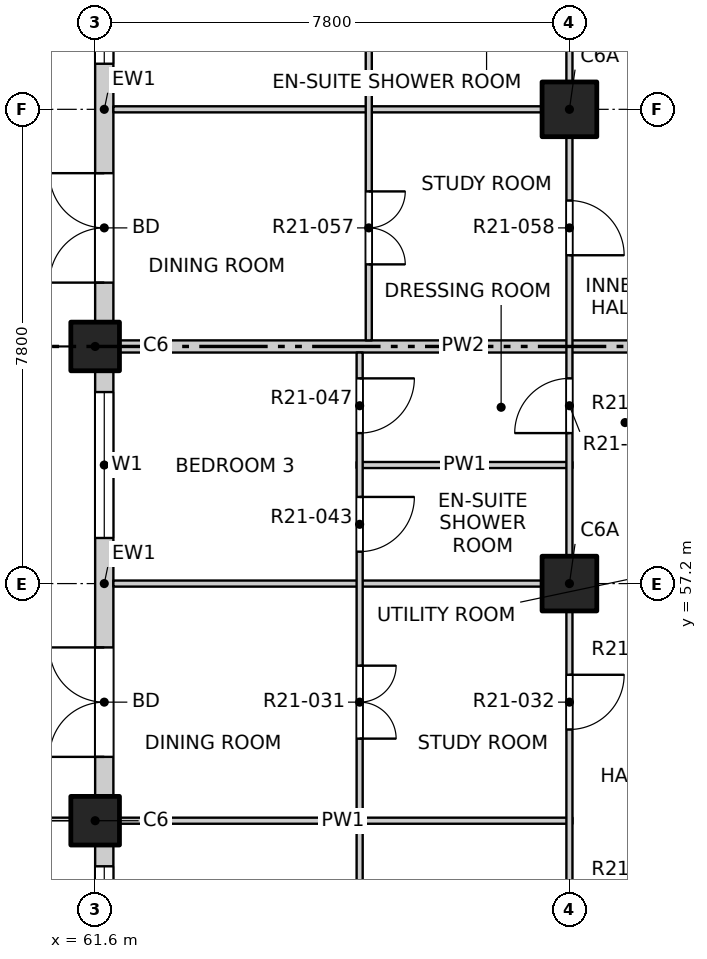
"""IFC4 building model, lengths in metres.
Left out: names, types, materials, properties, quantities, classifications, styles, units other than length and angle.
Written with IfcOpenShell. Run it as: python <this file> out.ifc"""

import sys

from ifc_helpers import new_model, si_unit, direction, frame, frame_2d, origin, origin_2d, place, context, subcontext, project, spatial, rectangle, extrude, element, fill, save


model = new_model("IFC4")
c1 = context("Model", 3, precision=1e-05, world=origin(), true_north=direction((0.0, 1.0)))
c2 = subcontext(c1, "Body", "Model", "MODEL_VIEW")
j1 = project(units=[si_unit("LENGTHUNIT", "METRE"), si_unit("PLANEANGLEUNIT", "RADIAN")], contexts=[c1])
p1 = place(None, origin())
s1 = spatial("IfcSite", under=j1, at=p1, CompositionType="ELEMENT")
p2 = place(p1, origin())
s2 = spatial("IfcBuilding", under=s1, at=p2, CompositionType="ELEMENT")
p3 = place(p2, frame((0.0, 0.0, 221.1)))
s3 = spatial("IfcBuildingStorey", under=s2, at=p3, CompositionType="ELEMENT", Elevation=221.1)
for number, where, z_axis, x_axis in (
    (1, (61.6, 53.3, -0.25), (0.0, 0.0, 1.0), (1.0, 0.0, 0.0)),
    (2, (61.6, 61.1, -0.25), (0.0, 0.0, 1.0), (1.0, 0.0, 0.0)),
):
    element("IfcColumn", number, at=place(p3, frame(where, z_axis=z_axis, x_axis=x_axis)), inside=s3, PredefinedType="COLUMN", context=c2, shape_type="SweptSolid", body=[
        extrude(rectangle(XDim=0.8, YDim=0.8, at=origin_2d()), origin(), (0.0, 0.0, 1.0), 3.4),
    ])
for number, where, z_axis, x_axis in (
    (3, (69.4, 57.2, -0.25), (0.0, 0.0, 1.0), (1.0, 0.0, 0.0)),
    (4, (69.4, 65.0, -0.25), (0.0, 0.0, 1.0), (1.0, 0.0, 0.0)),
):
    element("IfcColumn", number, at=place(p3, frame(where, z_axis=z_axis, x_axis=x_axis)), inside=s3, PredefinedType="COLUMN", context=c2, shape_type="SweptSolid", body=[
        extrude(rectangle(XDim=0.9, YDim=0.9, at=origin_2d()), origin(), (0.0, 0.0, 1.0), 3.4),
    ])
p4 = place(p3, frame((61.75, 45.5, 0.0), z_axis=(0.0, 0.0, 1.0), x_axis=(0.0, 1.0, 0.0)))
e5 = element("IfcWall", 5, at=p4, inside=s3, PredefinedType="SOLIDWALL", context=c2, shape_type="SweptSolid", body=[
    extrude(rectangle(XDim=7.4, YDim=0.3, at=frame_2d((3.7, 0.0))), origin(), (0.0, 0.0, 1.0), 2.7),
])
p5 = place(p4, frame((0.75, 0.0, 0.9)))
e6 = element("IfcOpeningElement", 6, at=p5, cuts=e5, PredefinedType="OPENING", context=c2, shape_type="SweptSolid", body=[
    extrude(rectangle(XDim=2.4, YDim=1.8, at=frame_2d((1.2, 0.9))), frame((0.0, 0.16, 0.0), z_axis=(0.0, -1.0, 0.0), x_axis=(1.0, 0.0, 0.0)), (0.0, 0.0, 1.0), 0.32),
])
p6 = place(p4, frame((4.65, 0.0, 0.9)))
e7 = element("IfcOpeningElement", 7, at=p6, cuts=e5, PredefinedType="OPENING", context=c2, shape_type="SweptSolid", body=[
    extrude(rectangle(XDim=2.4, YDim=1.8, at=frame_2d((1.2, 0.9))), frame((0.0, 0.16, 0.0), z_axis=(0.0, -1.0, 0.0), x_axis=(1.0, 0.0, 0.0)), (0.0, 0.0, 1.0), 0.32),
])
p7 = place(p3, frame((61.75, 53.7, 0.0), z_axis=(0.0, 0.0, 1.0), x_axis=(0.0, 1.0, 0.0)))
e8 = element("IfcWall", 8, at=p7, inside=s3, PredefinedType="SOLIDWALL", context=c2, shape_type="SweptSolid", body=[
    extrude(rectangle(XDim=7.0, YDim=0.3, at=frame_2d((3.5, 0.0))), origin(), (0.0, 0.0, 1.0), 2.7),
])
p8 = place(p7, frame((0.65, 0.0, 0.0)))
e9 = element("IfcOpeningElement", 9, at=p8, cuts=e8, PredefinedType="OPENING", context=c2, shape_type="SweptSolid", body=[
    extrude(rectangle(XDim=1.8, YDim=2.4, at=frame_2d((0.9, 1.2))), frame((0.0, 0.16, 0.0), z_axis=(0.0, -1.0, 0.0), x_axis=(1.0, 0.0, 0.0)), (0.0, 0.0, 1.0), 0.32),
])
p9 = place(p7, frame((4.25, 0.0, 0.9)))
e10 = element("IfcOpeningElement", 10, at=p9, cuts=e8, PredefinedType="OPENING", context=c2, shape_type="SweptSolid", body=[
    extrude(rectangle(XDim=2.4, YDim=1.8, at=frame_2d((1.2, 0.9))), frame((0.0, 0.16, 0.0), z_axis=(0.0, -1.0, 0.0), x_axis=(1.0, 0.0, 0.0)), (0.0, 0.0, 1.0), 0.32),
])
p10 = place(p3, frame((61.75, 61.5, 0.0), z_axis=(0.0, 0.0, 1.0), x_axis=(0.0, 1.0, 0.0)))
e11 = element("IfcWall", 11, at=p10, inside=s3, PredefinedType="SOLIDWALL", context=c2, shape_type="SweptSolid", body=[
    extrude(rectangle(XDim=7.0, YDim=0.3, at=frame_2d((3.5, 0.0))), origin(), (0.0, 0.0, 1.0), 2.7),
])
p11 = place(p10, frame((0.65, 0.0, 0.0)))
e12 = element("IfcOpeningElement", 12, at=p11, cuts=e11, PredefinedType="OPENING", context=c2, shape_type="SweptSolid", body=[
    extrude(rectangle(XDim=1.8, YDim=2.4, at=frame_2d((0.9, 1.2))), frame((0.0, 0.16, 0.0), z_axis=(0.0, -1.0, 0.0), x_axis=(1.0, 0.0, 0.0)), (0.0, 0.0, 1.0), 0.32),
])
p12 = place(p10, frame((4.25, 0.0, 0.9)))
e13 = element("IfcOpeningElement", 13, at=p12, cuts=e11, PredefinedType="OPENING", context=c2, shape_type="SweptSolid", body=[
    extrude(rectangle(XDim=2.4, YDim=1.8, at=frame_2d((1.2, 0.9))), frame((0.0, 0.16, 0.0), z_axis=(0.0, -1.0, 0.0), x_axis=(1.0, 0.0, 0.0)), (0.0, 0.0, 1.0), 0.32),
])
for number, where, z_axis, x_axis in (
    (14, (61.9, 53.3, 0.0), (0.0, 0.0, 1.0), (1.0, 0.0, 0.0)),
    (15, (61.9, 57.2, 0.0), (0.0, 0.0, 1.0), (1.0, 0.0, 0.0)),
):
    element("IfcWall", number, at=place(p3, frame(where, z_axis=z_axis, x_axis=x_axis)), inside=s3, PredefinedType="PARTITIONING", context=c2, shape_type="SweptSolid", body=[
        extrude(rectangle(XDim=7.55, YDim=0.1, at=frame_2d((3.775, 0.0))), origin(), (0.0, 0.0, 1.0), 3.15),
    ])
p13 = place(p3, frame((65.9, 59.15, 0.0), z_axis=(0.0, 0.0, 1.0), x_axis=(1.0, 0.0, 0.0)))
e16 = element("IfcWall", 16, at=p13, inside=s3, PredefinedType="PARTITIONING", context=c2, shape_type="SweptSolid", body=[
    extrude(rectangle(XDim=3.55, YDim=0.1, at=frame_2d((1.775, 0.0))), origin(), (0.0, 0.0, 1.0), 3.15),
])
p14 = place(p3, frame((61.9, 61.1, 0.0), z_axis=(0.0, 0.0, 1.0), x_axis=(1.0, 0.0, 0.0)))
e17 = element("IfcWall", 17, at=p14, inside=s3, PredefinedType="PARTITIONING", context=c2, shape_type="SweptSolid", body=[
    extrude(rectangle(XDim=11.5, YDim=0.2, at=frame_2d((5.75, 0.0))), origin(), (0.0, 0.0, 1.0), 2.55),
])
p15 = place(p3, frame((61.9, 65.0, 0.0), z_axis=(0.0, 0.0, 1.0), x_axis=(1.0, 0.0, 0.0)))
e18 = element("IfcWall", 18, at=p15, inside=s3, PredefinedType="PARTITIONING", context=c2, shape_type="SweptSolid", body=[
    extrude(rectangle(XDim=7.55, YDim=0.1, at=frame_2d((3.775, 0.0))), origin(), (0.0, 0.0, 1.0), 3.15),
])
p16 = place(p3, frame((65.95, 41.9, 0.0), z_axis=(0.0, 0.0, 1.0), x_axis=(0.0, 1.0, 0.0)))
e19 = element("IfcWall", 19, at=p16, inside=s3, PredefinedType="PARTITIONING", context=c2, shape_type="SweptSolid", body=[
    extrude(rectangle(XDim=19.1, YDim=0.1, at=frame_2d((9.55, 0.0))), origin(), (0.0, 0.0, 1.0), 3.15),
])
p17 = place(p16, frame((1.05, 0.0, 0.0)))
e20 = element("IfcOpeningElement", 20, at=p17, cuts=e19, PredefinedType="OPENING", context=c2, shape_type="SweptSolid", body=[
    extrude(rectangle(XDim=1.2, YDim=2.1, at=frame_2d((0.6, 1.05))), frame((0.0, 0.06, 0.0), z_axis=(0.0, -1.0, 0.0), x_axis=(1.0, 0.0, 0.0)), (0.0, 0.0, 1.0), 0.12),
])
p18 = place(p16, frame((4.125, 0.0, 0.0)))
e21 = element("IfcOpeningElement", 21, at=p18, cuts=e19, PredefinedType="OPENING", context=c2, shape_type="SweptSolid", body=[
    extrude(rectangle(XDim=0.9, YDim=2.1, at=frame_2d((0.45, 1.05))), frame((0.0, 0.06, 0.0), z_axis=(0.0, -1.0, 0.0), x_axis=(1.0, 0.0, 0.0)), (0.0, 0.0, 1.0), 0.12),
])
p19 = place(p16, frame((6.075, 0.0, 0.0)))
e22 = element("IfcOpeningElement", 22, at=p19, cuts=e19, PredefinedType="OPENING", context=c2, shape_type="SweptSolid", body=[
    extrude(rectangle(XDim=0.9, YDim=2.1, at=frame_2d((0.45, 1.05))), frame((0.0, 0.06, 0.0), z_axis=(0.0, -1.0, 0.0), x_axis=(1.0, 0.0, 0.0)), (0.0, 0.0, 1.0), 0.12),
])
p20 = place(p16, frame((8.85, 0.0, 0.0)))
e23 = element("IfcOpeningElement", 23, at=p20, cuts=e19, PredefinedType="OPENING", context=c2, shape_type="SweptSolid", body=[
    extrude(rectangle(XDim=1.2, YDim=2.1, at=frame_2d((0.6, 1.05))), frame((0.0, 0.06, 0.0), z_axis=(0.0, -1.0, 0.0), x_axis=(1.0, 0.0, 0.0)), (0.0, 0.0, 1.0), 0.12),
])
p21 = place(p16, frame((12.75, 0.0, 0.0)))
e24 = element("IfcOpeningElement", 24, at=p21, cuts=e19, PredefinedType="OPENING", context=c2, shape_type="SweptSolid", body=[
    extrude(rectangle(XDim=1.2, YDim=2.1, at=frame_2d((0.6, 1.05))), frame((0.0, 0.06, 0.0), z_axis=(0.0, -1.0, 0.0), x_axis=(1.0, 0.0, 0.0)), (0.0, 0.0, 1.0), 0.12),
])
p22 = place(p16, frame((15.825, 0.0, 0.0)))
e25 = element("IfcOpeningElement", 25, at=p22, cuts=e19, PredefinedType="OPENING", context=c2, shape_type="SweptSolid", body=[
    extrude(rectangle(XDim=0.9, YDim=2.1, at=frame_2d((0.45, 1.05))), frame((0.0, 0.06, 0.0), z_axis=(0.0, -1.0, 0.0), x_axis=(1.0, 0.0, 0.0)), (0.0, 0.0, 1.0), 0.12),
])
p23 = place(p16, frame((17.775, 0.0, 0.0)))
e26 = element("IfcOpeningElement", 26, at=p23, cuts=e19, PredefinedType="OPENING", context=c2, shape_type="SweptSolid", body=[
    extrude(rectangle(XDim=0.9, YDim=2.1, at=frame_2d((0.45, 1.05))), frame((0.0, 0.06, 0.0), z_axis=(0.0, -1.0, 0.0), x_axis=(1.0, 0.0, 0.0)), (0.0, 0.0, 1.0), 0.12),
])
p24 = place(p3, frame((66.1, 61.2, 0.0), z_axis=(0.0, 0.0, 1.0), x_axis=(0.0, 1.0, 0.0)))
e27 = element("IfcWall", 27, at=p24, inside=s3, PredefinedType="PARTITIONING", context=c2, shape_type="SweptSolid", body=[
    extrude(rectangle(XDim=26.9, YDim=0.1, at=frame_2d((13.45, 0.0))), origin(), (0.0, 0.0, 1.0), 3.15),
])
p25 = place(p24, frame((1.25, 0.0, 0.0)))
e28 = element("IfcOpeningElement", 28, at=p25, cuts=e27, PredefinedType="OPENING", context=c2, shape_type="SweptSolid", body=[
    extrude(rectangle(XDim=1.2, YDim=2.1, at=frame_2d((0.6, 1.05))), frame((0.0, 0.06, 0.0), z_axis=(0.0, -1.0, 0.0), x_axis=(1.0, 0.0, 0.0)), (0.0, 0.0, 1.0), 0.12),
])
p26 = place(p24, frame((5.15, 0.0, 0.0)))
e29 = element("IfcOpeningElement", 29, at=p26, cuts=e27, PredefinedType="OPENING", context=c2, shape_type="SweptSolid", body=[
    extrude(rectangle(XDim=1.2, YDim=2.1, at=frame_2d((0.6, 1.05))), frame((0.0, 0.06, 0.0), z_axis=(0.0, -1.0, 0.0), x_axis=(1.0, 0.0, 0.0)), (0.0, 0.0, 1.0), 0.12),
])
p27 = place(p24, frame((8.225, 0.0, 0.0)))
e30 = element("IfcOpeningElement", 30, at=p27, cuts=e27, PredefinedType="OPENING", context=c2, shape_type="SweptSolid", body=[
    extrude(rectangle(XDim=0.9, YDim=2.1, at=frame_2d((0.45, 1.05))), frame((0.0, 0.06, 0.0), z_axis=(0.0, -1.0, 0.0), x_axis=(1.0, 0.0, 0.0)), (0.0, 0.0, 1.0), 0.12),
])
p28 = place(p24, frame((10.175, 0.0, 0.0)))
e31 = element("IfcOpeningElement", 31, at=p28, cuts=e27, PredefinedType="OPENING", context=c2, shape_type="SweptSolid", body=[
    extrude(rectangle(XDim=0.9, YDim=2.1, at=frame_2d((0.45, 1.05))), frame((0.0, 0.06, 0.0), z_axis=(0.0, -1.0, 0.0), x_axis=(1.0, 0.0, 0.0)), (0.0, 0.0, 1.0), 0.12),
])
p29 = place(p24, frame((12.125, 0.0, 0.0)))
e32 = element("IfcOpeningElement", 32, at=p29, cuts=e27, PredefinedType="OPENING", context=c2, shape_type="SweptSolid", body=[
    extrude(rectangle(XDim=0.9, YDim=2.1, at=frame_2d((0.45, 1.05))), frame((0.0, 0.06, 0.0), z_axis=(0.0, -1.0, 0.0), x_axis=(1.0, 0.0, 0.0)), (0.0, 0.0, 1.0), 0.12),
])
p30 = place(p24, frame((14.075, 0.0, 0.0)))
e33 = element("IfcOpeningElement", 33, at=p30, cuts=e27, PredefinedType="OPENING", context=c2, shape_type="SweptSolid", body=[
    extrude(rectangle(XDim=0.9, YDim=2.1, at=frame_2d((0.45, 1.05))), frame((0.0, 0.06, 0.0), z_axis=(0.0, -1.0, 0.0), x_axis=(1.0, 0.0, 0.0)), (0.0, 0.0, 1.0), 0.12),
])
p31 = place(p24, frame((16.85, 0.0, 0.0)))
e34 = element("IfcOpeningElement", 34, at=p31, cuts=e27, PredefinedType="OPENING", context=c2, shape_type="SweptSolid", body=[
    extrude(rectangle(XDim=1.2, YDim=2.1, at=frame_2d((0.6, 1.05))), frame((0.0, 0.06, 0.0), z_axis=(0.0, -1.0, 0.0), x_axis=(1.0, 0.0, 0.0)), (0.0, 0.0, 1.0), 0.12),
])
p32 = place(p24, frame((19.925, 0.0, 0.0)))
e35 = element("IfcOpeningElement", 35, at=p32, cuts=e27, PredefinedType="OPENING", context=c2, shape_type="SweptSolid", body=[
    extrude(rectangle(XDim=0.9, YDim=2.1, at=frame_2d((0.45, 1.05))), frame((0.0, 0.06, 0.0), z_axis=(0.0, -1.0, 0.0), x_axis=(1.0, 0.0, 0.0)), (0.0, 0.0, 1.0), 0.12),
])
p33 = place(p24, frame((21.875, 0.0, 0.0)))
e36 = element("IfcOpeningElement", 36, at=p33, cuts=e27, PredefinedType="OPENING", context=c2, shape_type="SweptSolid", body=[
    extrude(rectangle(XDim=0.9, YDim=2.1, at=frame_2d((0.45, 1.05))), frame((0.0, 0.06, 0.0), z_axis=(0.0, -1.0, 0.0), x_axis=(1.0, 0.0, 0.0)), (0.0, 0.0, 1.0), 0.12),
])
p34 = place(p24, frame((24.65, 0.0, 0.0)))
e37 = element("IfcOpeningElement", 37, at=p34, cuts=e27, PredefinedType="OPENING", context=c2, shape_type="SweptSolid", body=[
    extrude(rectangle(XDim=1.2, YDim=2.1, at=frame_2d((0.6, 1.05))), frame((0.0, 0.06, 0.0), z_axis=(0.0, -1.0, 0.0), x_axis=(1.0, 0.0, 0.0)), (0.0, 0.0, 1.0), 0.12),
])
p35 = place(p3, frame((69.4, 41.9, 0.0), z_axis=(0.0, 0.0, 1.0), x_axis=(0.0, 1.0, 0.0)))
e38 = element("IfcWall", 38, at=p35, inside=s3, PredefinedType="PARTITIONING", context=c2, shape_type="SweptSolid", body=[
    extrude(rectangle(XDim=46.2, YDim=0.1, at=frame_2d((23.1, 0.0))), origin(), (0.0, 0.0, 1.0), 3.15),
])
p36 = place(p35, frame((1.2, 0.0, 0.0)))
e39 = element("IfcOpeningElement", 39, at=p36, cuts=e38, PredefinedType="OPENING", context=c2, shape_type="SweptSolid", body=[
    extrude(rectangle(XDim=0.9, YDim=2.1, at=frame_2d((0.45, 1.05))), frame((0.0, 0.06, 0.0), z_axis=(0.0, -1.0, 0.0), x_axis=(1.0, 0.0, 0.0)), (0.0, 0.0, 1.0), 0.12),
])
p37 = place(p35, frame((6.025, 0.0, 0.0)))
e40 = element("IfcOpeningElement", 40, at=p37, cuts=e38, PredefinedType="OPENING", context=c2, shape_type="SweptSolid", body=[
    extrude(rectangle(XDim=0.9, YDim=2.1, at=frame_2d((0.45, 1.05))), frame((0.0, 0.06, 0.0), z_axis=(0.0, -1.0, 0.0), x_axis=(1.0, 0.0, 0.0)), (0.0, 0.0, 1.0), 0.12),
])
p38 = place(p35, frame((9.0, 0.0, 0.0)))
e41 = element("IfcOpeningElement", 41, at=p38, cuts=e38, PredefinedType="OPENING", context=c2, shape_type="SweptSolid", body=[
    extrude(rectangle(XDim=0.9, YDim=2.1, at=frame_2d((0.45, 1.05))), frame((0.0, 0.06, 0.0), z_axis=(0.0, -1.0, 0.0), x_axis=(1.0, 0.0, 0.0)), (0.0, 0.0, 1.0), 0.12),
])
p39 = place(p35, frame((12.9, 0.0, 0.0)))
e42 = element("IfcOpeningElement", 42, at=p39, cuts=e38, PredefinedType="OPENING", context=c2, shape_type="SweptSolid", body=[
    extrude(rectangle(XDim=0.9, YDim=2.1, at=frame_2d((0.45, 1.05))), frame((0.0, 0.06, 0.0), z_axis=(0.0, -1.0, 0.0), x_axis=(1.0, 0.0, 0.0)), (0.0, 0.0, 1.0), 0.12),
])
p40 = place(p35, frame((17.775, 0.0, 0.0)))
e43 = element("IfcOpeningElement", 43, at=p40, cuts=e38, PredefinedType="OPENING", context=c2, shape_type="SweptSolid", body=[
    extrude(rectangle(XDim=0.9, YDim=2.1, at=frame_2d((0.45, 1.05))), frame((0.0, 0.06, 0.0), z_axis=(0.0, -1.0, 0.0), x_axis=(1.0, 0.0, 0.0)), (0.0, 0.0, 1.0), 0.12),
])
p41 = place(p35, frame((20.7, 0.0, 0.0)))
e44 = element("IfcOpeningElement", 44, at=p41, cuts=e38, PredefinedType="OPENING", context=c2, shape_type="SweptSolid", body=[
    extrude(rectangle(XDim=0.9, YDim=2.1, at=frame_2d((0.45, 1.05))), frame((0.0, 0.06, 0.0), z_axis=(0.0, -1.0, 0.0), x_axis=(1.0, 0.0, 0.0)), (0.0, 0.0, 1.0), 0.12),
])
p42 = place(p35, frame((24.6, 0.0, 0.0)))
e45 = element("IfcOpeningElement", 45, at=p42, cuts=e38, PredefinedType="OPENING", context=c2, shape_type="SweptSolid", body=[
    extrude(rectangle(XDim=0.9, YDim=2.1, at=frame_2d((0.45, 1.05))), frame((0.0, 0.06, 0.0), z_axis=(0.0, -1.0, 0.0), x_axis=(1.0, 0.0, 0.0)), (0.0, 0.0, 1.0), 0.12),
])
p43 = place(p35, frame((29.425, 0.0, 0.0)))
e46 = element("IfcOpeningElement", 46, at=p43, cuts=e38, PredefinedType="OPENING", context=c2, shape_type="SweptSolid", body=[
    extrude(rectangle(XDim=0.9, YDim=2.1, at=frame_2d((0.45, 1.05))), frame((0.0, 0.06, 0.0), z_axis=(0.0, -1.0, 0.0), x_axis=(1.0, 0.0, 0.0)), (0.0, 0.0, 1.0), 0.12),
])
p44 = place(p35, frame((33.375, 0.0, 0.0)))
e47 = element("IfcOpeningElement", 47, at=p44, cuts=e38, PredefinedType="OPENING", context=c2, shape_type="SweptSolid", body=[
    extrude(rectangle(XDim=0.9, YDim=2.1, at=frame_2d((0.45, 1.05))), frame((0.0, 0.06, 0.0), z_axis=(0.0, -1.0, 0.0), x_axis=(1.0, 0.0, 0.0)), (0.0, 0.0, 1.0), 0.12),
])
p45 = place(p35, frame((36.3, 0.0, 0.0)))
e48 = element("IfcOpeningElement", 48, at=p45, cuts=e38, PredefinedType="OPENING", context=c2, shape_type="SweptSolid", body=[
    extrude(rectangle(XDim=0.9, YDim=2.1, at=frame_2d((0.45, 1.05))), frame((0.0, 0.06, 0.0), z_axis=(0.0, -1.0, 0.0), x_axis=(1.0, 0.0, 0.0)), (0.0, 0.0, 1.0), 0.12),
])
p46 = place(p35, frame((41.175, 0.0, 0.0)))
e49 = element("IfcOpeningElement", 49, at=p46, cuts=e38, PredefinedType="OPENING", context=c2, shape_type="SweptSolid", body=[
    extrude(rectangle(XDim=0.9, YDim=2.1, at=frame_2d((0.45, 1.05))), frame((0.0, 0.06, 0.0), z_axis=(0.0, -1.0, 0.0), x_axis=(1.0, 0.0, 0.0)), (0.0, 0.0, 1.0), 0.12),
])
p47 = place(p35, frame((44.1, 0.0, 0.0)))
e50 = element("IfcOpeningElement", 50, at=p47, cuts=e38, PredefinedType="OPENING", context=c2, shape_type="SweptSolid", body=[
    extrude(rectangle(XDim=0.9, YDim=2.1, at=frame_2d((0.45, 1.05))), frame((0.0, 0.06, 0.0), z_axis=(0.0, -1.0, 0.0), x_axis=(1.0, 0.0, 0.0)), (0.0, 0.0, 1.0), 0.12),
])
p48 = place(p6, origin())
e51 = element("IfcWindow", 51, at=p48, inside=s3, PartitioningType="DOUBLE_PANEL_VERTICAL", PredefinedType="WINDOW", context=c2, shape_type="SweptSolid", body=[
    extrude(rectangle(XDim=2.4, YDim=1.8, at=frame_2d((1.2, 0.9))), frame((0.0, 0.03, 0.0), z_axis=(0.0, -1.0, 0.0), x_axis=(1.0, 0.0, 0.0)), (0.0, 0.0, 1.0), 0.06),
])
fill(e7, e51)
p49 = place(p8, origin())
e52 = element("IfcDoor", 52, at=p49, inside=s3, OperationType="DOUBLE_DOOR_SINGLE_SWING", PredefinedType="DOOR", context=c2, shape_type="SweptSolid", body=[
    extrude(rectangle(XDim=1.8, YDim=2.4, at=frame_2d((0.9, 1.2))), frame((0.0, 0.025, 0.0), z_axis=(0.0, -1.0, 0.0), x_axis=(1.0, 0.0, 0.0)), (0.0, 0.0, 1.0), 0.05),
])
fill(e9, e52)
p50 = place(p9, origin())
e53 = element("IfcWindow", 53, at=p50, inside=s3, PartitioningType="DOUBLE_PANEL_VERTICAL", PredefinedType="WINDOW", context=c2, shape_type="SweptSolid", body=[
    extrude(rectangle(XDim=2.4, YDim=1.8, at=frame_2d((1.2, 0.9))), frame((0.0, 0.03, 0.0), z_axis=(0.0, -1.0, 0.0), x_axis=(1.0, 0.0, 0.0)), (0.0, 0.0, 1.0), 0.06),
])
fill(e10, e53)
p51 = place(p11, origin())
e54 = element("IfcDoor", 54, at=p51, inside=s3, OperationType="DOUBLE_DOOR_SINGLE_SWING", PredefinedType="DOOR", context=c2, shape_type="SweptSolid", body=[
    extrude(rectangle(XDim=1.8, YDim=2.4, at=frame_2d((0.9, 1.2))), frame((0.0, 0.025, 0.0), z_axis=(0.0, -1.0, 0.0), x_axis=(1.0, 0.0, 0.0)), (0.0, 0.0, 1.0), 0.05),
])
fill(e12, e54)
p52 = place(p12, origin())
e55 = element("IfcWindow", 55, at=p52, inside=s3, PartitioningType="DOUBLE_PANEL_VERTICAL", PredefinedType="WINDOW", context=c2, shape_type="SweptSolid", body=[
    extrude(rectangle(XDim=2.4, YDim=1.8, at=frame_2d((1.2, 0.9))), frame((0.0, 0.03, 0.0), z_axis=(0.0, -1.0, 0.0), x_axis=(1.0, 0.0, 0.0)), (0.0, 0.0, 1.0), 0.06),
])
fill(e13, e55)
p53 = place(p21, origin())
e56 = element("IfcDoor", 56, at=p53, inside=s3, OperationType="DOUBLE_DOOR_SINGLE_SWING", PredefinedType="DOOR", context=c2, shape_type="SweptSolid", body=[
    extrude(rectangle(XDim=1.2, YDim=2.1, at=frame_2d((0.6, 1.05))), frame((0.0, 0.025, 0.0), z_axis=(0.0, -1.0, 0.0), x_axis=(1.0, 0.0, 0.0)), (0.0, 0.0, 1.0), 0.05),
])
fill(e24, e56)
p54 = place(p39, origin())
e57 = element("IfcDoor", 57, at=p54, inside=s3, OperationType="SINGLE_SWING_LEFT", PredefinedType="DOOR", context=c2, shape_type="SweptSolid", body=[
    extrude(rectangle(XDim=0.9, YDim=2.1, at=frame_2d((0.45, 1.05))), frame((0.0, 0.025, 0.0), z_axis=(0.0, -1.0, 0.0), x_axis=(1.0, 0.0, 0.0)), (0.0, 0.0, 1.0), 0.05),
])
fill(e42, e57)
p55 = place(p22, origin())
e58 = element("IfcDoor", 58, at=p55, inside=s3, OperationType="SINGLE_SWING_LEFT", PredefinedType="DOOR", context=c2, shape_type="SweptSolid", body=[
    extrude(rectangle(XDim=0.9, YDim=2.1, at=frame_2d((0.45, 1.05))), frame((0.0, 0.025, 0.0), z_axis=(0.0, -1.0, 0.0), x_axis=(1.0, 0.0, 0.0)), (0.0, 0.0, 1.0), 0.05),
])
fill(e25, e58)
p56 = place(p23, origin())
e59 = element("IfcDoor", 59, at=p56, inside=s3, OperationType="SINGLE_SWING_LEFT", PredefinedType="DOOR", context=c2, shape_type="SweptSolid", body=[
    extrude(rectangle(XDim=0.9, YDim=2.1, at=frame_2d((0.45, 1.05))), frame((0.0, 0.025, 0.0), z_axis=(0.0, -1.0, 0.0), x_axis=(1.0, 0.0, 0.0)), (0.0, 0.0, 1.0), 0.05),
])
fill(e26, e59)
p57 = place(p40, origin())
e60 = element("IfcDoor", 60, at=p57, inside=s3, OperationType="SINGLE_SWING_LEFT", PredefinedType="DOOR", context=c2, shape_type="SweptSolid", body=[
    extrude(rectangle(XDim=0.9, YDim=2.1, at=frame_2d((0.45, 1.05))), frame((0.0, 0.025, 0.0), z_axis=(0.0, -1.0, 0.0), x_axis=(1.0, 0.0, 0.0)), (0.0, 0.0, 1.0), 0.05),
])
fill(e43, e60)
p58 = place(p25, origin())
e61 = element("IfcDoor", 61, at=p58, inside=s3, OperationType="DOUBLE_DOOR_SINGLE_SWING", PredefinedType="DOOR", context=c2, shape_type="SweptSolid", body=[
    extrude(rectangle(XDim=1.2, YDim=2.1, at=frame_2d((0.6, 1.05))), frame((0.0, 0.025, 0.0), z_axis=(0.0, -1.0, 0.0), x_axis=(1.0, 0.0, 0.0)), (0.0, 0.0, 1.0), 0.05),
])
fill(e28, e61)
p59 = place(p41, origin())
e62 = element("IfcDoor", 62, at=p59, inside=s3, OperationType="SINGLE_SWING_RIGHT", PredefinedType="DOOR", context=c2, shape_type="SweptSolid", body=[
    extrude(rectangle(XDim=0.9, YDim=2.1, at=frame_2d((0.45, 1.05))), frame((0.0, 0.025, 0.0), z_axis=(0.0, -1.0, 0.0), x_axis=(1.0, 0.0, 0.0)), (0.0, 0.0, 1.0), 0.05),
])
fill(e44, e62)
save(model, sys.argv[1])
